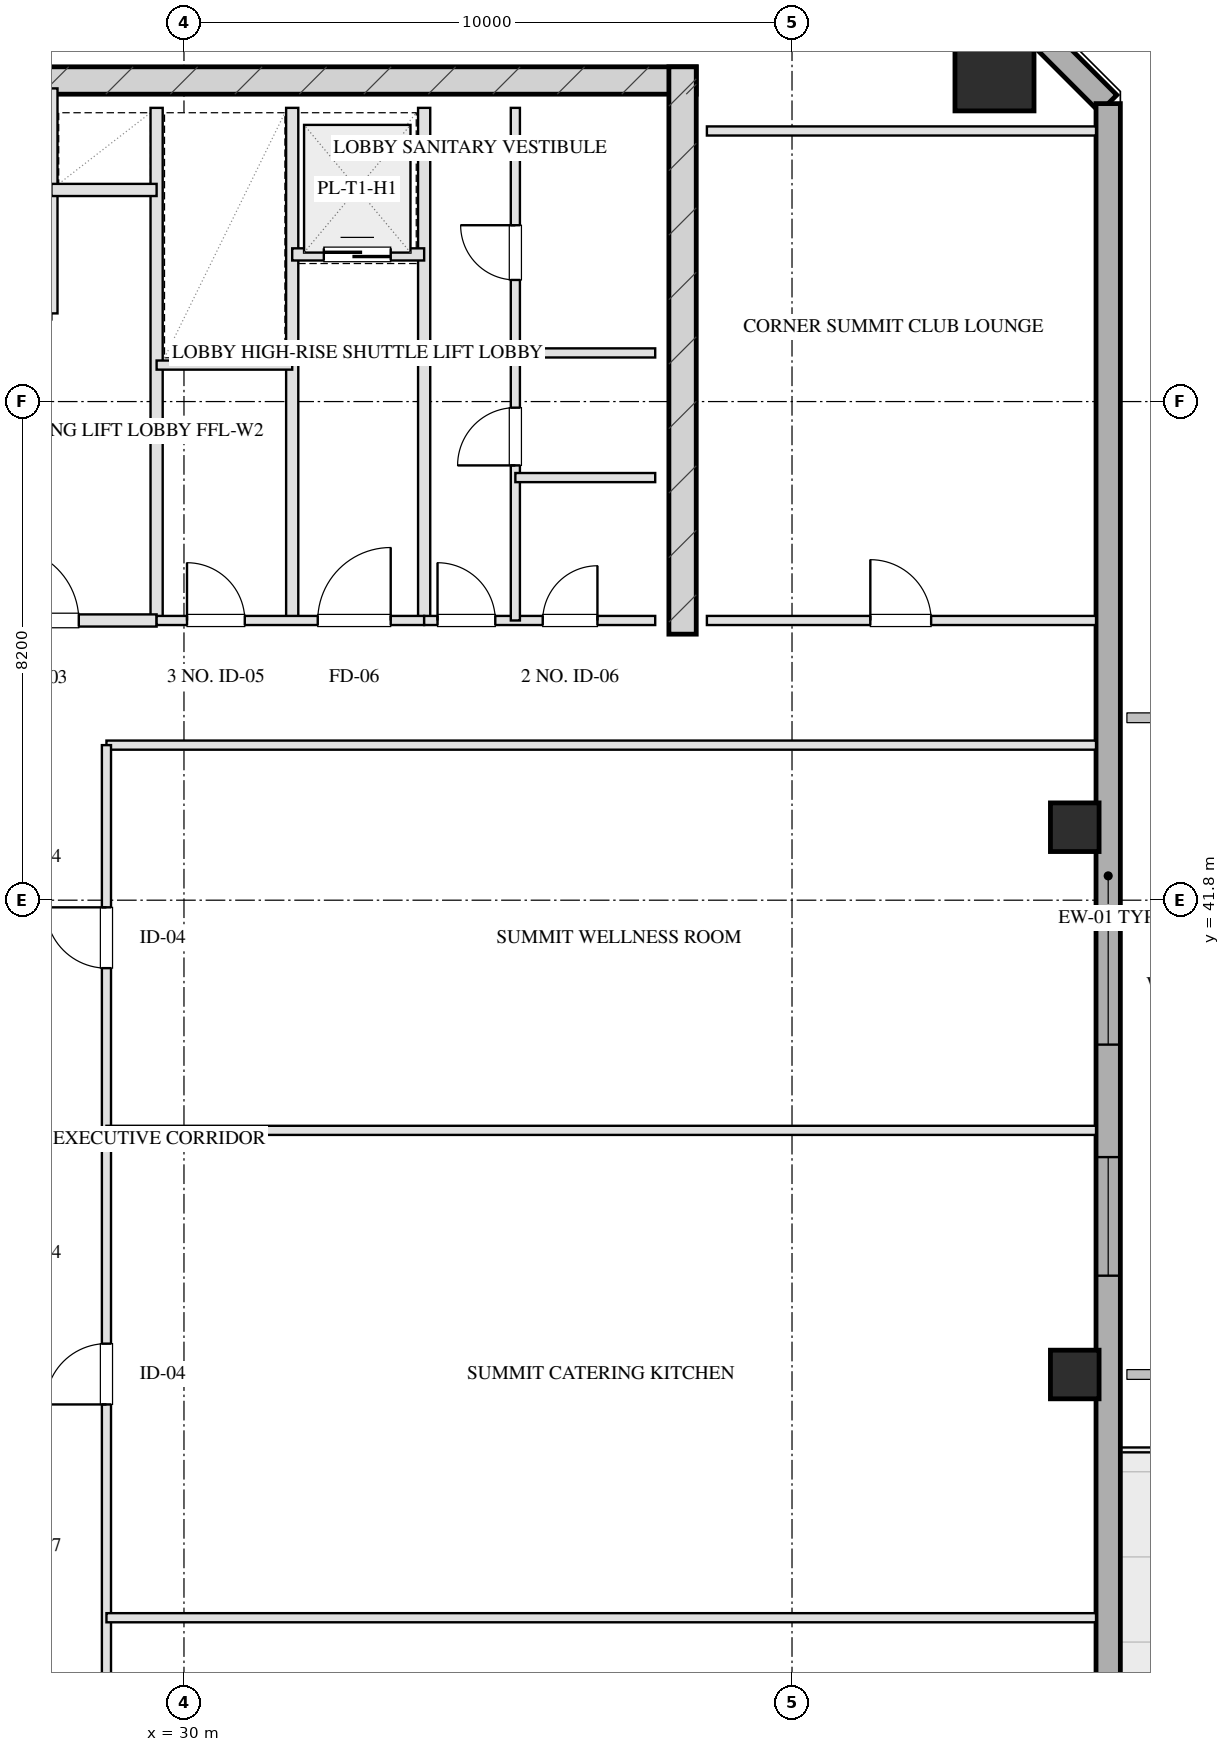
"""IFC4 building model, lengths in metres.
Left out: names, types, materials, properties, quantities, classifications, styles, units other than length and angle.
Written with IfcOpenShell. Run it as: python <this file> out.ifc"""

import sys

from ifc_helpers import new_model, si_unit, direction, frame, frame_2d, origin, origin_2d, place, context, subcontext, project, spatial, rectangle, hollow_rectangle, extrude, element, fill, save


model = new_model("IFC4")
c1 = context("Model", 3, precision=1e-05, world=origin(), true_north=direction((0.0, 1.0)))
c2 = subcontext(c1, "Body", "Model", "MODEL_VIEW")
j1 = project(units=[si_unit("LENGTHUNIT", "METRE"), si_unit("PLANEANGLEUNIT", "RADIAN")], contexts=[c1])
p1 = place(None, origin())
s1 = spatial("IfcSite", under=j1, at=p1, CompositionType="ELEMENT")
p2 = place(p1, origin())
s2 = spatial("IfcBuilding", under=s1, at=p2, CompositionType="ELEMENT")
p3 = place(p2, frame((0.0, 0.0, 276.0)))
s3 = spatial("IfcBuildingStorey", under=s2, at=p3, CompositionType="ELEMENT", Elevation=276.0)
p4 = place(p3, frame((21.575, 55.28, 0.0), z_axis=(0.0, 0.0, 1.0), x_axis=(1.0, 0.0, 0.0)))
e1 = element("IfcWall", 1, at=p4, inside=s3, PredefinedType="SHEAR", context=c2, shape_type="SweptSolid", body=[
    extrude(rectangle(XDim=16.85, YDim=0.45, at=frame_2d((8.425, 0.0))), origin(), (0.0, 0.0, 1.0), 4.2),
])
p5 = place(p3, frame((38.2, 46.175, 0.0), z_axis=(0.0, 0.0, 1.0), x_axis=(0.0, 1.0, 0.0)))
e2 = element("IfcWall", 2, at=p5, inside=s3, PredefinedType="SHEAR", context=c2, shape_type="SweptSolid", body=[
    extrude(rectangle(XDim=9.33, YDim=0.45, at=frame_2d((4.665, 0.0))), origin(), (0.0, 0.0, 1.0), 4.2),
])
p6 = place(p3, frame((43.33, 55.43, 0.0), z_axis=(0.0, 0.0, 1.0), x_axis=(1.0, 0.0, 0.0)))
e3 = element("IfcColumn", 3, at=p6, inside=s3, PredefinedType="COLUMN", context=c2, shape_type="SweptSolid", body=[
    extrude(hollow_rectangle(XDim=1.3, YDim=1.3, WallThickness=0.045, at=origin_2d()), origin(), (0.0, 0.0, 1.0), 4.201),
])
for number, where, z_axis, x_axis in (
    (4, (44.65, 34.0, 0.0), (0.0, 0.0, 1.0), (1.0, 0.0, 0.0)),
    (5, (44.65, 43.0, 0.0), (0.0, 0.0, 1.0), (1.0, 0.0, 0.0)),
):
    element("IfcColumn", number, at=place(p3, frame(where, z_axis=z_axis, x_axis=x_axis)), inside=s3, PredefinedType="COLUMN", context=c2, shape_type="SweptSolid", body=[
        extrude(hollow_rectangle(XDim=0.8, YDim=0.8, WallThickness=0.028, at=origin_2d()), origin(), (0.0, 0.0, 1.0), 4.201),
    ])
p7 = place(p3, frame((42.8, 57.3, 0.0), z_axis=(0.0, 0.0, 1.0), x_axis=(0.707070815327, -0.707142745217, 0.0)))
e6 = element("IfcWall", 6, at=p7, inside=s3, PredefinedType="SOLIDWALL", context=c2, shape_type="SweptSolid", body=[
    extrude(rectangle(XDim=3.394, YDim=0.4, at=frame_2d((1.697, 0.0))), origin(), (0.0, 0.0, 1.0), 3.33),
])
p8 = place(p3, frame((45.2, 54.9, 0.0), z_axis=(0.0, 0.0, 1.0), x_axis=(0.0, -1.0, 0.0)))
e7 = element("IfcWall", 7, at=p8, inside=s3, PredefinedType="SOLIDWALL", context=c2, shape_type="SweptSolid", body=[
    extrude(rectangle(XDim=41.8, YDim=0.4, at=frame_2d((20.9, 0.0))), origin(), (0.0, 0.0, 1.0), 3.33),
])
p9 = place(p8, frame((17.325, 0.0, 0.75)))
e8 = element("IfcOpeningElement", 8, at=p9, cuts=e7, PredefinedType="OPENING", context=c2, shape_type="SweptSolid", body=[
    extrude(rectangle(XDim=1.95, YDim=1.65, at=frame_2d((0.975, 0.825))), frame((0.0, 0.21, 0.0), z_axis=(0.0, -1.0, 0.0), x_axis=(1.0, 0.0, 0.0)), (0.0, 0.0, 1.0), 0.42),
])
p10 = place(p8, frame((13.525, 0.0, 0.75)))
e9 = element("IfcOpeningElement", 9, at=p10, cuts=e7, PredefinedType="OPENING", context=c2, shape_type="SweptSolid", body=[
    extrude(rectangle(XDim=1.95, YDim=1.65, at=frame_2d((0.975, 0.825))), frame((0.0, 0.21, 0.0), z_axis=(0.0, -1.0, 0.0), x_axis=(1.0, 0.0, 0.0)), (0.0, 0.0, 1.0), 0.42),
])
p11 = place(p8, frame((26.15, 0.0, 0.0)))
e10 = element("IfcOpeningElement", 10, at=p11, cuts=e7, PredefinedType="OPENING", context=c2, shape_type="SweptSolid", body=[
    extrude(rectangle(XDim=1.1, YDim=2.15, at=frame_2d((0.55, 1.075))), frame((0.0, 0.21, 0.0), z_axis=(0.0, -1.0, 0.0), x_axis=(1.0, 0.0, 0.0)), (0.0, 0.0, 1.0), 0.42),
])
p12 = place(p3, frame((29.55, 46.4, 0.0), z_axis=(0.0, 0.0, 1.0), x_axis=(0.0, 1.0, 0.0)))
e11 = element("IfcWall", 11, at=p12, inside=s3, PredefinedType="PARTITIONING", context=c2, shape_type="SweptSolid", body=[
    extrude(rectangle(XDim=8.43, YDim=0.2, at=frame_2d((4.215, 0.0))), origin(), (0.0, 0.0, 1.0), 3.925),
])
p13 = place(p3, frame((25.72, 46.4, 0.0), z_axis=(0.0, 0.0, 1.0), x_axis=(1.0, 0.0, 0.0)))
e12 = element("IfcWall", 12, at=p13, inside=s3, PredefinedType="PARTITIONING", context=c2, shape_type="SweptSolid", body=[
    extrude(rectangle(XDim=3.83, YDim=0.2, at=frame_2d((1.915, 0.0))), origin(), (0.0, 0.0, 1.0), 3.925),
])
p14 = place(p13, frame((1.35, 0.0, 0.0)))
e13 = element("IfcOpeningElement", 13, at=p14, cuts=e12, PredefinedType="OPENING", context=c2, shape_type="SweptSolid", body=[
    extrude(rectangle(XDim=1.2, YDim=2.05, at=frame_2d((0.6, 1.025))), frame((0.0, 0.11, 0.0), z_axis=(0.0, -1.0, 0.0), x_axis=(1.0, 0.0, 0.0)), (0.0, 0.0, 1.0), 0.22),
])
p15 = place(p3, frame((27.82, 51.45, 0.0), z_axis=(0.0, 0.0, 1.0), x_axis=(0.0, 1.0, 0.0)))
e14 = element("IfcWall", 14, at=p15, inside=s3, PredefinedType="PARTITIONING", context=c2, shape_type="SweptSolid", body=[
    extrude(rectangle(XDim=3.7, YDim=0.2, at=frame_2d((1.85, 0.0))), origin(), (0.0, 0.0, 1.0), 3.925),
])
p16 = place(p3, frame((27.82, 53.48, 0.0), z_axis=(0.0, 0.0, 1.0), x_axis=(1.0, 0.0, 0.0)))
e15 = element("IfcWall", 15, at=p16, inside=s3, PredefinedType="PARTITIONING", context=c2, shape_type="SweptSolid", body=[
    extrude(rectangle(XDim=1.73, YDim=0.2, at=frame_2d((0.865, 0.0))), origin(), (0.0, 0.0, 1.0), 3.925),
])
for number, where, z_axis, x_axis in (
    (16, (33.95, 46.4, 0.0), (0.0, 0.0, 1.0), (0.0, 1.0, 0.0)),
    (17, (31.78, 46.4, 0.0), (0.0, 0.0, 1.0), (0.0, 1.0, 0.0)),
):
    element("IfcWall", number, at=place(p3, frame(where, z_axis=z_axis, x_axis=x_axis)), inside=s3, PredefinedType="PARTITIONING", context=c2, shape_type="SweptSolid", body=[
        extrude(rectangle(XDim=8.43, YDim=0.2, at=frame_2d((4.215, 0.0))), origin(), (0.0, 0.0, 1.0), 3.925),
    ])
p17 = place(p3, frame((29.55, 46.4, 0.0), z_axis=(0.0, 0.0, 1.0), x_axis=(1.0, 0.0, 0.0)))
e18 = element("IfcWall", 18, at=p17, inside=s3, PredefinedType="PARTITIONING", context=c2, shape_type="SweptSolid", body=[
    extrude(rectangle(XDim=4.4, YDim=0.15, at=frame_2d((2.2, 0.0))), origin(), (0.0, 0.0, 1.0), 3.925),
])
p18 = place(p17, frame((0.5, 0.0, 0.0)))
e19 = element("IfcOpeningElement", 19, at=p18, cuts=e18, PredefinedType="OPENING", context=c2, shape_type="SweptSolid", body=[
    extrude(rectangle(XDim=0.95, YDim=2.05, at=frame_2d((0.475, 1.025))), frame((0.0, 0.085, 0.0), z_axis=(0.0, -1.0, 0.0), x_axis=(1.0, 0.0, 0.0)), (0.0, 0.0, 1.0), 0.17),
])
p19 = place(p17, frame((2.65, 0.0, 0.0)))
e20 = element("IfcOpeningElement", 20, at=p19, cuts=e18, PredefinedType="OPENING", context=c2, shape_type="SweptSolid", body=[
    extrude(rectangle(XDim=1.2, YDim=2.05, at=frame_2d((0.6, 1.025))), frame((0.0, 0.085, 0.0), z_axis=(0.0, -1.0, 0.0), x_axis=(1.0, 0.0, 0.0)), (0.0, 0.0, 1.0), 0.17),
])
p20 = place(p3, frame((29.55, 50.6, 0.0), z_axis=(0.0, 0.0, 1.0), x_axis=(1.0, 0.0, 0.0)))
e21 = element("IfcWall", 21, at=p20, inside=s3, PredefinedType="PARTITIONING", context=c2, shape_type="SweptSolid", body=[
    extrude(rectangle(XDim=2.23, YDim=0.15, at=frame_2d((1.115, 0.0))), origin(), (0.0, 0.0, 1.0), 3.925),
])
p21 = place(p3, frame((31.78, 52.42, 0.0), z_axis=(0.0, 0.0, 1.0), x_axis=(1.0, 0.0, 0.0)))
e22 = element("IfcWall", 22, at=p21, inside=s3, PredefinedType="PARTITIONING", context=c2, shape_type="SweptSolid", body=[
    extrude(rectangle(XDim=2.17, YDim=0.2, at=frame_2d((1.085, 0.0))), origin(), (0.0, 0.0, 1.0), 3.925),
])
p22 = place(p21, frame((0.52, 0.0, 0.0)))
e23 = element("IfcOpeningElement", 23, at=p22, cuts=e22, PredefinedType="OPENING", context=c2, shape_type="SweptSolid", body=[
    extrude(rectangle(XDim=1.1, YDim=2.05, at=frame_2d((0.55, 1.025))), frame((0.0, 0.11, 0.0), z_axis=(0.0, -1.0, 0.0), x_axis=(1.0, 0.0, 0.0)), (0.0, 0.0, 1.0), 0.22),
])
p23 = place(p3, frame((33.95, 46.4, 0.0), z_axis=(0.0, 0.0, 1.0), x_axis=(1.0, 0.0, 0.0)))
e24 = element("IfcWall", 24, at=p23, inside=s3, PredefinedType="PARTITIONING", context=c2, shape_type="SweptSolid", body=[
    extrude(rectangle(XDim=3.8, YDim=0.15, at=frame_2d((1.9, 0.0))), origin(), (0.0, 0.0, 1.0), 3.925),
])
p24 = place(p23, frame((0.22, 0.0, 0.0)))
e25 = element("IfcOpeningElement", 25, at=p24, cuts=e24, PredefinedType="OPENING", context=c2, shape_type="SweptSolid", body=[
    extrude(rectangle(XDim=0.95, YDim=2.05, at=frame_2d((0.475, 1.025))), frame((0.0, 0.085, 0.0), z_axis=(0.0, -1.0, 0.0), x_axis=(1.0, 0.0, 0.0)), (0.0, 0.0, 1.0), 0.17),
])
p25 = place(p23, frame((1.95, 0.0, 0.0)))
e26 = element("IfcOpeningElement", 26, at=p25, cuts=e24, PredefinedType="OPENING", context=c2, shape_type="SweptSolid", body=[
    extrude(rectangle(XDim=0.9, YDim=2.05, at=frame_2d((0.45, 1.025))), frame((0.0, 0.085, 0.0), z_axis=(0.0, -1.0, 0.0), x_axis=(1.0, 0.0, 0.0)), (0.0, 0.0, 1.0), 0.17),
])
p26 = place(p3, frame((35.45, 46.4, 0.0), z_axis=(0.0, 0.0, 1.0), x_axis=(0.0, 1.0, 0.0)))
e27 = element("IfcWall", 27, at=p26, inside=s3, PredefinedType="PARTITIONING", context=c2, shape_type="SweptSolid", body=[
    extrude(rectangle(XDim=8.43, YDim=0.15, at=frame_2d((4.215, 0.0))), origin(), (0.0, 0.0, 1.0), 3.515),
])
p27 = place(p26, frame((2.55, 0.0, 0.0)))
e28 = element("IfcOpeningElement", 28, at=p27, cuts=e27, PredefinedType="OPENING", context=c2, shape_type="SweptSolid", body=[
    extrude(rectangle(XDim=0.95, YDim=2.05, at=frame_2d((0.475, 1.025))), frame((0.0, 0.085, 0.0), z_axis=(0.0, -1.0, 0.0), x_axis=(1.0, 0.0, 0.0)), (0.0, 0.0, 1.0), 0.17),
])
p28 = place(p26, frame((5.6, 0.0, 0.0)))
e29 = element("IfcOpeningElement", 29, at=p28, cuts=e27, PredefinedType="OPENING", context=c2, shape_type="SweptSolid", body=[
    extrude(rectangle(XDim=0.9, YDim=2.05, at=frame_2d((0.45, 1.025))), frame((0.0, 0.085, 0.0), z_axis=(0.0, -1.0, 0.0), x_axis=(1.0, 0.0, 0.0)), (0.0, 0.0, 1.0), 0.17),
])
for number, where, z_axis, x_axis in (
    (30, (35.45, 50.8, 0.0), (0.0, 0.0, 1.0), (1.0, 0.0, 0.0)),
    (31, (35.45, 48.75, 0.0), (0.0, 0.0, 1.0), (1.0, 0.0, 0.0)),
):
    element("IfcWall", number, at=place(p3, frame(where, z_axis=z_axis, x_axis=x_axis)), inside=s3, PredefinedType="PARTITIONING", context=c2, shape_type="SweptSolid", body=[
        extrude(rectangle(XDim=2.3, YDim=0.15, at=frame_2d((1.15, 0.0))), origin(), (0.0, 0.0, 1.0), 3.925),
    ])
p29 = place(p3, frame((38.6, 54.45, 0.0), z_axis=(0.0, 0.0, 1.0), x_axis=(1.0, 0.0, 0.0)))
e32 = element("IfcWall", 32, at=p29, inside=s3, PredefinedType="PARTITIONING", context=c2, shape_type="SweptSolid", body=[
    extrude(rectangle(XDim=6.4, YDim=0.15, at=frame_2d((3.2, 0.0))), origin(), (0.0, 0.0, 1.0), 3.925),
])
p30 = place(p3, frame((38.6, 46.4, 0.0), z_axis=(0.0, 0.0, 1.0), x_axis=(1.0, 0.0, 0.0)))
e33 = element("IfcWall", 33, at=p30, inside=s3, PredefinedType="PARTITIONING", context=c2, shape_type="SweptSolid", body=[
    extrude(rectangle(XDim=6.4, YDim=0.15, at=frame_2d((3.2, 0.0))), origin(), (0.0, 0.0, 1.0), 3.925),
])
p31 = place(p30, frame((2.688, 0.0, 0.0)))
e34 = element("IfcOpeningElement", 34, at=p31, cuts=e33, PredefinedType="OPENING", context=c2, shape_type="SweptSolid", body=[
    extrude(rectangle(XDim=1.0, YDim=2.05, at=frame_2d((0.5, 1.025))), frame((0.0, 0.085, 0.0), z_axis=(0.0, -1.0, 0.0), x_axis=(1.0, 0.0, 0.0)), (0.0, 0.0, 1.0), 0.17),
])
p32 = place(p3, frame((28.725, 44.35, 0.0), z_axis=(0.0, 0.0, 1.0), x_axis=(1.0, 0.0, 0.0)))
e35 = element("IfcWall", 35, at=p32, inside=s3, PredefinedType="PARTITIONING", context=c2, shape_type="SweptSolid", body=[
    extrude(rectangle(XDim=16.275, YDim=0.15, at=frame_2d((8.137, 0.0))), origin(), (0.0, 0.0, 1.0), 3.925),
])
p33 = place(p3, frame((28.725, 23.65, 0.0), z_axis=(0.0, 0.0, 1.0), x_axis=(0.0, 1.0, 0.0)))
e36 = element("IfcWall", 36, at=p33, inside=s3, PredefinedType="PARTITIONING", context=c2, shape_type="SweptSolid", body=[
    extrude(rectangle(XDim=20.7, YDim=0.15, at=frame_2d((10.35, 0.0))), origin(), (0.0, 0.0, 1.0), 3.925),
])
p34 = place(p33, frame((2.675, 0.0, 0.0)))
e37 = element("IfcOpeningElement", 37, at=p34, cuts=e36, PredefinedType="OPENING", context=c2, shape_type="SweptSolid", body=[
    extrude(rectangle(XDim=0.85, YDim=2.05, at=frame_2d((0.425, 1.025))), frame((0.0, 0.085, 0.0), z_axis=(0.0, -1.0, 0.0), x_axis=(1.0, 0.0, 0.0)), (0.0, 0.0, 1.0), 0.17),
])
p35 = place(p33, frame((9.857, 0.0, 0.0)))
e38 = element("IfcOpeningElement", 38, at=p35, cuts=e36, PredefinedType="OPENING", context=c2, shape_type="SweptSolid", body=[
    extrude(rectangle(XDim=1.0, YDim=2.05, at=frame_2d((0.5, 1.025))), frame((0.0, 0.085, 0.0), z_axis=(0.0, -1.0, 0.0), x_axis=(1.0, 0.0, 0.0)), (0.0, 0.0, 1.0), 0.17),
])
p36 = place(p33, frame((17.032, 0.0, 0.0)))
e39 = element("IfcOpeningElement", 39, at=p36, cuts=e36, PredefinedType="OPENING", context=c2, shape_type="SweptSolid", body=[
    extrude(rectangle(XDim=1.0, YDim=2.05, at=frame_2d((0.5, 1.025))), frame((0.0, 0.085, 0.0), z_axis=(0.0, -1.0, 0.0), x_axis=(1.0, 0.0, 0.0)), (0.0, 0.0, 1.0), 0.17),
])
for number, where, z_axis, x_axis in (
    (40, (28.725, 30.0, 0.0), (0.0, 0.0, 1.0), (1.0, 0.0, 0.0)),
    (41, (28.725, 38.015, 0.0), (0.0, 0.0, 1.0), (1.0, 0.0, 0.0)),
):
    element("IfcWall", number, at=place(p3, frame(where, z_axis=z_axis, x_axis=x_axis)), inside=s3, PredefinedType="PARTITIONING", context=c2, shape_type="SweptSolid", body=[
        extrude(rectangle(XDim=16.275, YDim=0.15, at=frame_2d((8.137, 0.0))), origin(), (0.0, 0.0, 1.0), 3.925),
    ])
p37 = place(p9, origin())
e42 = element("IfcWindow", 42, at=p37, inside=s3, PartitioningType="TRIPLE_PANEL_VERTICAL", PredefinedType="WINDOW", context=c2, shape_type="SweptSolid", body=[
    extrude(rectangle(XDim=1.95, YDim=1.65, at=frame_2d((0.975, 0.825))), frame((0.0, 0.03, 0.0), z_axis=(0.0, -1.0, 0.0), x_axis=(1.0, 0.0, 0.0)), (0.0, 0.0, 1.0), 0.06),
])
fill(e8, e42)
p38 = place(p10, origin())
e43 = element("IfcWindow", 43, at=p38, inside=s3, PartitioningType="TRIPLE_PANEL_VERTICAL", PredefinedType="WINDOW", context=c2, shape_type="SweptSolid", body=[
    extrude(rectangle(XDim=1.95, YDim=1.65, at=frame_2d((0.975, 0.825))), frame((0.0, 0.03, 0.0), z_axis=(0.0, -1.0, 0.0), x_axis=(1.0, 0.0, 0.0)), (0.0, 0.0, 1.0), 0.06),
])
fill(e9, e43)
p39 = place(p14, origin())
e44 = element("IfcDoor", 44, at=p39, inside=s3, OperationType="SINGLE_SWING_LEFT", PredefinedType="DOOR", context=c2, shape_type="SweptSolid", body=[
    extrude(rectangle(XDim=1.2, YDim=2.05, at=frame_2d((0.6, 1.025))), frame((0.0, 0.025, 0.0), z_axis=(0.0, -1.0, 0.0), x_axis=(1.0, 0.0, 0.0)), (0.0, 0.0, 1.0), 0.05),
])
fill(e13, e44)
p40 = place(p18, origin())
e45 = element("IfcDoor", 45, at=p40, inside=s3, OperationType="SINGLE_SWING_LEFT", PredefinedType="DOOR", context=c2, shape_type="SweptSolid", body=[
    extrude(rectangle(XDim=0.95, YDim=2.05, at=frame_2d((0.475, 1.025))), frame((0.0, 0.025, 0.0), z_axis=(0.0, -1.0, 0.0), x_axis=(1.0, 0.0, 0.0)), (0.0, 0.0, 1.0), 0.05),
])
fill(e19, e45)
p41 = place(p19, origin())
e46 = element("IfcDoor", 46, at=p41, inside=s3, OperationType="SINGLE_SWING_RIGHT", PredefinedType="DOOR", context=c2, shape_type="SweptSolid", body=[
    extrude(rectangle(XDim=1.2, YDim=2.05, at=frame_2d((0.6, 1.025))), frame((0.0, 0.025, 0.0), z_axis=(0.0, -1.0, 0.0), x_axis=(1.0, 0.0, 0.0)), (0.0, 0.0, 1.0), 0.05),
])
fill(e20, e46)
p42 = place(p22, origin())
e47 = element("IfcDoor", 47, at=p42, inside=s3, OperationType="DOUBLE_DOOR_SLIDING", PredefinedType="DOOR", context=c2, shape_type="SweptSolid", body=[
    extrude(rectangle(XDim=1.1, YDim=2.05, at=frame_2d((0.55, 1.025))), frame((0.0, 0.025, 0.0), z_axis=(0.0, -1.0, 0.0), x_axis=(1.0, 0.0, 0.0)), (0.0, 0.0, 1.0), 0.05),
])
fill(e23, e47)
p43 = place(p24, origin())
e48 = element("IfcDoor", 48, at=p43, inside=s3, OperationType="SINGLE_SWING_LEFT", PredefinedType="DOOR", context=c2, shape_type="SweptSolid", body=[
    extrude(rectangle(XDim=0.95, YDim=2.05, at=frame_2d((0.475, 1.025))), frame((0.0, 0.025, 0.0), z_axis=(0.0, -1.0, 0.0), x_axis=(1.0, 0.0, 0.0)), (0.0, 0.0, 1.0), 0.05),
])
fill(e25, e48)
p44 = place(p25, origin())
e49 = element("IfcDoor", 49, at=p44, inside=s3, OperationType="SINGLE_SWING_RIGHT", PredefinedType="DOOR", context=c2, shape_type="SweptSolid", body=[
    extrude(rectangle(XDim=0.9, YDim=2.05, at=frame_2d((0.45, 1.025))), frame((0.0, 0.025, 0.0), z_axis=(0.0, -1.0, 0.0), x_axis=(1.0, 0.0, 0.0)), (0.0, 0.0, 1.0), 0.05),
])
fill(e26, e49)
p45 = place(p27, origin())
e50 = element("IfcDoor", 50, at=p45, inside=s3, OperationType="SINGLE_SWING_LEFT", PredefinedType="DOOR", context=c2, shape_type="SweptSolid", body=[
    extrude(rectangle(XDim=0.95, YDim=2.05, at=frame_2d((0.475, 1.025))), frame((0.0, 0.025, 0.0), z_axis=(0.0, -1.0, 0.0), x_axis=(1.0, 0.0, 0.0)), (0.0, 0.0, 1.0), 0.05),
])
fill(e28, e50)
p46 = place(p28, origin())
e51 = element("IfcDoor", 51, at=p46, inside=s3, OperationType="SINGLE_SWING_RIGHT", PredefinedType="DOOR", context=c2, shape_type="SweptSolid", body=[
    extrude(rectangle(XDim=0.9, YDim=2.05, at=frame_2d((0.45, 1.025))), frame((0.0, 0.025, 0.0), z_axis=(0.0, -1.0, 0.0), x_axis=(1.0, 0.0, 0.0)), (0.0, 0.0, 1.0), 0.05),
])
fill(e29, e51)
p47 = place(p31, origin())
e52 = element("IfcDoor", 52, at=p47, inside=s3, OperationType="SINGLE_SWING_LEFT", PredefinedType="DOOR", context=c2, shape_type="SweptSolid", body=[
    extrude(rectangle(XDim=1.0, YDim=2.05, at=frame_2d((0.5, 1.025))), frame((0.0, 0.025, 0.0), z_axis=(0.0, -1.0, 0.0), x_axis=(1.0, 0.0, 0.0)), (0.0, 0.0, 1.0), 0.05),
])
fill(e34, e52)
p48 = place(p35, origin())
e53 = element("IfcDoor", 53, at=p48, inside=s3, OperationType="SINGLE_SWING_LEFT", PredefinedType="DOOR", context=c2, shape_type="SweptSolid", body=[
    extrude(rectangle(XDim=1.0, YDim=2.05, at=frame_2d((0.5, 1.025))), frame((0.0, 0.025, 0.0), z_axis=(0.0, -1.0, 0.0), x_axis=(1.0, 0.0, 0.0)), (0.0, 0.0, 1.0), 0.05),
])
fill(e38, e53)
p49 = place(p36, origin())
e54 = element("IfcDoor", 54, at=p49, inside=s3, OperationType="SINGLE_SWING_RIGHT", PredefinedType="DOOR", context=c2, shape_type="SweptSolid", body=[
    extrude(rectangle(XDim=1.0, YDim=2.05, at=frame_2d((0.5, 1.025))), frame((0.0, 0.025, 0.0), z_axis=(0.0, -1.0, 0.0), x_axis=(1.0, 0.0, 0.0)), (0.0, 0.0, 1.0), 0.05),
])
fill(e39, e54)
save(model, sys.argv[1])
